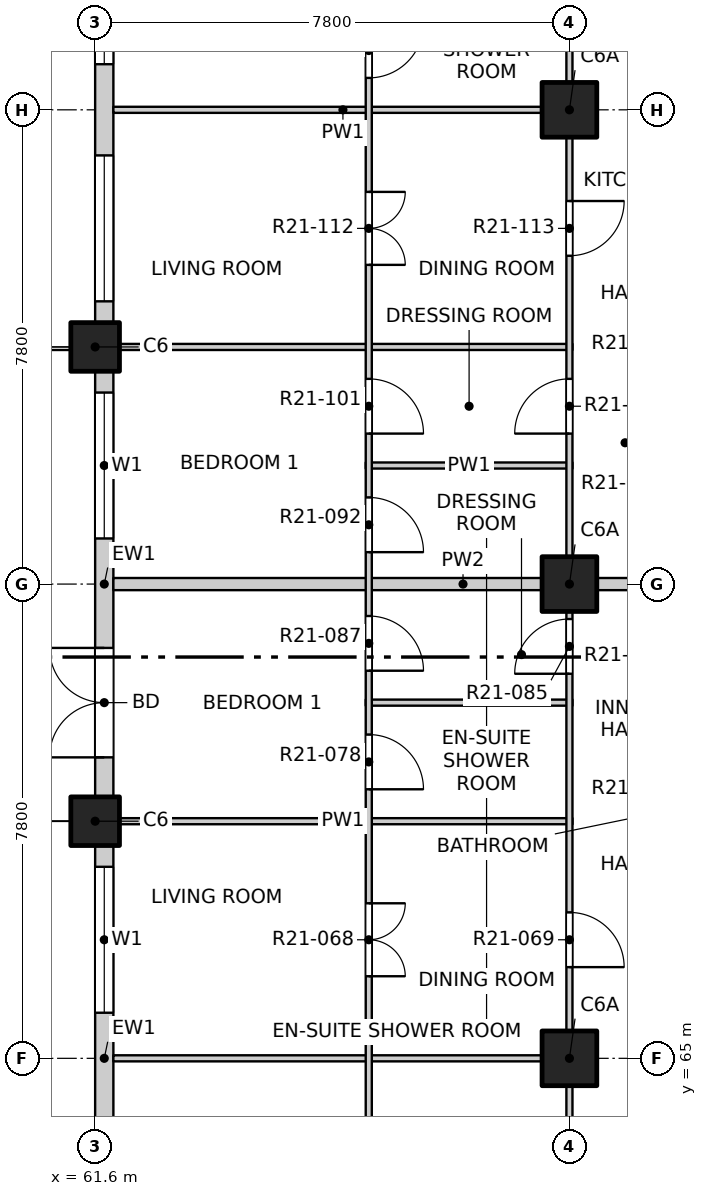
"""IFC4 building model, lengths in metres.
Left out: names, types, materials, properties, quantities, classifications, styles, units other than length and angle.
Written with IfcOpenShell. Run it as: python <this file> out.ifc"""

import sys

from ifc_helpers import new_model, si_unit, direction, frame, frame_2d, origin, origin_2d, place, context, subcontext, project, spatial, rectangle, extrude, element, fill, save


model = new_model("IFC4")
c1 = context("Model", 3, precision=1e-05, world=origin(), true_north=direction((0.0, 1.0)))
c2 = subcontext(c1, "Body", "Model", "MODEL_VIEW")
j1 = project(units=[si_unit("LENGTHUNIT", "METRE"), si_unit("PLANEANGLEUNIT", "RADIAN")], contexts=[c1])
p1 = place(None, origin())
s1 = spatial("IfcSite", under=j1, at=p1, CompositionType="ELEMENT")
p2 = place(p1, origin())
s2 = spatial("IfcBuilding", under=s1, at=p2, CompositionType="ELEMENT")
p3 = place(p2, frame((0.0, 0.0, 221.1)))
s3 = spatial("IfcBuildingStorey", under=s2, at=p3, CompositionType="ELEMENT", Elevation=221.1)
for number, where, z_axis, x_axis in (
    (1, (61.6, 68.9, -0.25), (0.0, 0.0, 1.0), (1.0, 0.0, 0.0)),
    (2, (61.6, 76.7, -0.25), (0.0, 0.0, 1.0), (1.0, 0.0, 0.0)),
):
    element("IfcColumn", number, at=place(p3, frame(where, z_axis=z_axis, x_axis=x_axis)), inside=s3, PredefinedType="COLUMN", context=c2, shape_type="SweptSolid", body=[
        extrude(rectangle(XDim=0.8, YDim=0.8, at=origin_2d()), origin(), (0.0, 0.0, 1.0), 3.4),
    ])
for number, where, z_axis, x_axis in (
    (3, (69.4, 65.0, -0.25), (0.0, 0.0, 1.0), (1.0, 0.0, 0.0)),
    (4, (69.4, 72.8, -0.25), (0.0, 0.0, 1.0), (1.0, 0.0, 0.0)),
    (5, (69.4, 80.6, -0.25), (0.0, 0.0, 1.0), (1.0, 0.0, 0.0)),
):
    element("IfcColumn", number, at=place(p3, frame(where, z_axis=z_axis, x_axis=x_axis)), inside=s3, PredefinedType="COLUMN", context=c2, shape_type="SweptSolid", body=[
        extrude(rectangle(XDim=0.9, YDim=0.9, at=origin_2d()), origin(), (0.0, 0.0, 1.0), 3.4),
    ])
p4 = place(p3, frame((61.75, 61.5, 0.0), z_axis=(0.0, 0.0, 1.0), x_axis=(0.0, 1.0, 0.0)))
e6 = element("IfcWall", 6, at=p4, inside=s3, PredefinedType="SOLIDWALL", context=c2, shape_type="SweptSolid", body=[
    extrude(rectangle(XDim=7.0, YDim=0.3, at=frame_2d((3.5, 0.0))), origin(), (0.0, 0.0, 1.0), 2.7),
])
p5 = place(p4, frame((0.65, 0.0, 0.0)))
e7 = element("IfcOpeningElement", 7, at=p5, cuts=e6, PredefinedType="OPENING", context=c2, shape_type="SweptSolid", body=[
    extrude(rectangle(XDim=1.8, YDim=2.4, at=frame_2d((0.9, 1.2))), frame((0.0, 0.16, 0.0), z_axis=(0.0, -1.0, 0.0), x_axis=(1.0, 0.0, 0.0)), (0.0, 0.0, 1.0), 0.32),
])
p6 = place(p4, frame((4.25, 0.0, 0.9)))
e8 = element("IfcOpeningElement", 8, at=p6, cuts=e6, PredefinedType="OPENING", context=c2, shape_type="SweptSolid", body=[
    extrude(rectangle(XDim=2.4, YDim=1.8, at=frame_2d((1.2, 0.9))), frame((0.0, 0.16, 0.0), z_axis=(0.0, -1.0, 0.0), x_axis=(1.0, 0.0, 0.0)), (0.0, 0.0, 1.0), 0.32),
])
p7 = place(p3, frame((61.75, 69.3, 0.0), z_axis=(0.0, 0.0, 1.0), x_axis=(0.0, 1.0, 0.0)))
e9 = element("IfcWall", 9, at=p7, inside=s3, PredefinedType="SOLIDWALL", context=c2, shape_type="SweptSolid", body=[
    extrude(rectangle(XDim=7.0, YDim=0.3, at=frame_2d((3.5, 0.0))), origin(), (0.0, 0.0, 1.0), 2.7),
])
p8 = place(p7, frame((0.65, 0.0, 0.0)))
e10 = element("IfcOpeningElement", 10, at=p8, cuts=e9, PredefinedType="OPENING", context=c2, shape_type="SweptSolid", body=[
    extrude(rectangle(XDim=1.8, YDim=2.4, at=frame_2d((0.9, 1.2))), frame((0.0, 0.16, 0.0), z_axis=(0.0, -1.0, 0.0), x_axis=(1.0, 0.0, 0.0)), (0.0, 0.0, 1.0), 0.32),
])
p9 = place(p7, frame((4.25, 0.0, 0.9)))
e11 = element("IfcOpeningElement", 11, at=p9, cuts=e9, PredefinedType="OPENING", context=c2, shape_type="SweptSolid", body=[
    extrude(rectangle(XDim=2.4, YDim=1.8, at=frame_2d((1.2, 0.9))), frame((0.0, 0.16, 0.0), z_axis=(0.0, -1.0, 0.0), x_axis=(1.0, 0.0, 0.0)), (0.0, 0.0, 1.0), 0.32),
])
p10 = place(p3, frame((61.75, 77.1, 0.0), z_axis=(0.0, 0.0, 1.0), x_axis=(0.0, 1.0, 0.0)))
e12 = element("IfcWall", 12, at=p10, inside=s3, PredefinedType="SOLIDWALL", context=c2, shape_type="SweptSolid", body=[
    extrude(rectangle(XDim=7.4, YDim=0.3, at=frame_2d((3.7, 0.0))), origin(), (0.0, 0.0, 1.0), 2.7),
])
p11 = place(p10, frame((0.35, 0.0, 0.9)))
e13 = element("IfcOpeningElement", 13, at=p11, cuts=e12, PredefinedType="OPENING", context=c2, shape_type="SweptSolid", body=[
    extrude(rectangle(XDim=2.4, YDim=1.8, at=frame_2d((1.2, 0.9))), frame((0.0, 0.16, 0.0), z_axis=(0.0, -1.0, 0.0), x_axis=(1.0, 0.0, 0.0)), (0.0, 0.0, 1.0), 0.32),
])
p12 = place(p10, frame((4.25, 0.0, 0.9)))
e14 = element("IfcOpeningElement", 14, at=p12, cuts=e12, PredefinedType="OPENING", context=c2, shape_type="SweptSolid", body=[
    extrude(rectangle(XDim=2.4, YDim=1.8, at=frame_2d((1.2, 0.9))), frame((0.0, 0.16, 0.0), z_axis=(0.0, -1.0, 0.0), x_axis=(1.0, 0.0, 0.0)), (0.0, 0.0, 1.0), 0.32),
])
p13 = place(p3, frame((61.9, 65.0, 0.0), z_axis=(0.0, 0.0, 1.0), x_axis=(1.0, 0.0, 0.0)))
e15 = element("IfcWall", 15, at=p13, inside=s3, PredefinedType="PARTITIONING", context=c2, shape_type="SweptSolid", body=[
    extrude(rectangle(XDim=7.55, YDim=0.1, at=frame_2d((3.775, 0.0))), origin(), (0.0, 0.0, 1.0), 3.15),
])
p14 = place(p3, frame((61.9, 68.9, 0.0), z_axis=(0.0, 0.0, 1.0), x_axis=(1.0, 0.0, 0.0)))
e16 = element("IfcWall", 16, at=p14, inside=s3, PredefinedType="PARTITIONING", context=c2, shape_type="SweptSolid", body=[
    extrude(rectangle(XDim=7.55, YDim=0.1, at=frame_2d((3.775, 0.0))), origin(), (0.0, 0.0, 1.0), 2.55),
])
p15 = place(p3, frame((66.05, 70.85, 0.0), z_axis=(0.0, 0.0, 1.0), x_axis=(1.0, 0.0, 0.0)))
e17 = element("IfcWall", 17, at=p15, inside=s3, PredefinedType="PARTITIONING", context=c2, shape_type="SweptSolid", body=[
    extrude(rectangle(XDim=3.4, YDim=0.1, at=frame_2d((1.7, 0.0))), origin(), (0.0, 0.0, 1.0), 3.15),
])
p16 = place(p3, frame((61.9, 72.8, 0.0), z_axis=(0.0, 0.0, 1.0), x_axis=(1.0, 0.0, 0.0)))
e18 = element("IfcWall", 18, at=p16, inside=s3, PredefinedType="PARTITIONING", context=c2, shape_type="SweptSolid", body=[
    extrude(rectangle(XDim=11.5, YDim=0.2, at=frame_2d((5.75, 0.0))), origin(), (0.0, 0.0, 1.0), 3.15),
])
p17 = place(p3, frame((66.05, 74.75, 0.0), z_axis=(0.0, 0.0, 1.0), x_axis=(1.0, 0.0, 0.0)))
e19 = element("IfcWall", 19, at=p17, inside=s3, PredefinedType="PARTITIONING", context=c2, shape_type="SweptSolid", body=[
    extrude(rectangle(XDim=3.4, YDim=0.1, at=frame_2d((1.7, 0.0))), origin(), (0.0, 0.0, 1.0), 3.15),
])
p18 = place(p3, frame((61.9, 76.7, 0.0), z_axis=(0.0, 0.0, 1.0), x_axis=(1.0, 0.0, 0.0)))
e20 = element("IfcWall", 20, at=p18, inside=s3, PredefinedType="PARTITIONING", context=c2, shape_type="SweptSolid", body=[
    extrude(rectangle(XDim=7.55, YDim=0.1, at=frame_2d((3.775, 0.0))), origin(), (0.0, 0.0, 1.0), 2.55),
])
p19 = place(p3, frame((61.9, 80.6, 0.0), z_axis=(0.0, 0.0, 1.0), x_axis=(1.0, 0.0, 0.0)))
e21 = element("IfcWall", 21, at=p19, inside=s3, PredefinedType="PARTITIONING", context=c2, shape_type="SweptSolid", body=[
    extrude(rectangle(XDim=7.55, YDim=0.1, at=frame_2d((3.775, 0.0))), origin(), (0.0, 0.0, 1.0), 3.15),
])
p20 = place(p3, frame((66.1, 61.2, 0.0), z_axis=(0.0, 0.0, 1.0), x_axis=(0.0, 1.0, 0.0)))
e22 = element("IfcWall", 22, at=p20, inside=s3, PredefinedType="PARTITIONING", context=c2, shape_type="SweptSolid", body=[
    extrude(rectangle(XDim=26.9, YDim=0.1, at=frame_2d((13.45, 0.0))), origin(), (0.0, 0.0, 1.0), 3.15),
])
p21 = place(p20, frame((1.25, 0.0, 0.0)))
e23 = element("IfcOpeningElement", 23, at=p21, cuts=e22, PredefinedType="OPENING", context=c2, shape_type="SweptSolid", body=[
    extrude(rectangle(XDim=1.2, YDim=2.1, at=frame_2d((0.6, 1.05))), frame((0.0, 0.06, 0.0), z_axis=(0.0, -1.0, 0.0), x_axis=(1.0, 0.0, 0.0)), (0.0, 0.0, 1.0), 0.12),
])
p22 = place(p20, frame((5.15, 0.0, 0.0)))
e24 = element("IfcOpeningElement", 24, at=p22, cuts=e22, PredefinedType="OPENING", context=c2, shape_type="SweptSolid", body=[
    extrude(rectangle(XDim=1.2, YDim=2.1, at=frame_2d((0.6, 1.05))), frame((0.0, 0.06, 0.0), z_axis=(0.0, -1.0, 0.0), x_axis=(1.0, 0.0, 0.0)), (0.0, 0.0, 1.0), 0.12),
])
p23 = place(p20, frame((8.225, 0.0, 0.0)))
e25 = element("IfcOpeningElement", 25, at=p23, cuts=e22, PredefinedType="OPENING", context=c2, shape_type="SweptSolid", body=[
    extrude(rectangle(XDim=0.9, YDim=2.1, at=frame_2d((0.45, 1.05))), frame((0.0, 0.06, 0.0), z_axis=(0.0, -1.0, 0.0), x_axis=(1.0, 0.0, 0.0)), (0.0, 0.0, 1.0), 0.12),
])
p24 = place(p20, frame((10.175, 0.0, 0.0)))
e26 = element("IfcOpeningElement", 26, at=p24, cuts=e22, PredefinedType="OPENING", context=c2, shape_type="SweptSolid", body=[
    extrude(rectangle(XDim=0.9, YDim=2.1, at=frame_2d((0.45, 1.05))), frame((0.0, 0.06, 0.0), z_axis=(0.0, -1.0, 0.0), x_axis=(1.0, 0.0, 0.0)), (0.0, 0.0, 1.0), 0.12),
])
p25 = place(p20, frame((12.125, 0.0, 0.0)))
e27 = element("IfcOpeningElement", 27, at=p25, cuts=e22, PredefinedType="OPENING", context=c2, shape_type="SweptSolid", body=[
    extrude(rectangle(XDim=0.9, YDim=2.1, at=frame_2d((0.45, 1.05))), frame((0.0, 0.06, 0.0), z_axis=(0.0, -1.0, 0.0), x_axis=(1.0, 0.0, 0.0)), (0.0, 0.0, 1.0), 0.12),
])
p26 = place(p20, frame((14.075, 0.0, 0.0)))
e28 = element("IfcOpeningElement", 28, at=p26, cuts=e22, PredefinedType="OPENING", context=c2, shape_type="SweptSolid", body=[
    extrude(rectangle(XDim=0.9, YDim=2.1, at=frame_2d((0.45, 1.05))), frame((0.0, 0.06, 0.0), z_axis=(0.0, -1.0, 0.0), x_axis=(1.0, 0.0, 0.0)), (0.0, 0.0, 1.0), 0.12),
])
p27 = place(p20, frame((16.85, 0.0, 0.0)))
e29 = element("IfcOpeningElement", 29, at=p27, cuts=e22, PredefinedType="OPENING", context=c2, shape_type="SweptSolid", body=[
    extrude(rectangle(XDim=1.2, YDim=2.1, at=frame_2d((0.6, 1.05))), frame((0.0, 0.06, 0.0), z_axis=(0.0, -1.0, 0.0), x_axis=(1.0, 0.0, 0.0)), (0.0, 0.0, 1.0), 0.12),
])
p28 = place(p20, frame((19.925, 0.0, 0.0)))
e30 = element("IfcOpeningElement", 30, at=p28, cuts=e22, PredefinedType="OPENING", context=c2, shape_type="SweptSolid", body=[
    extrude(rectangle(XDim=0.9, YDim=2.1, at=frame_2d((0.45, 1.05))), frame((0.0, 0.06, 0.0), z_axis=(0.0, -1.0, 0.0), x_axis=(1.0, 0.0, 0.0)), (0.0, 0.0, 1.0), 0.12),
])
p29 = place(p20, frame((21.875, 0.0, 0.0)))
e31 = element("IfcOpeningElement", 31, at=p29, cuts=e22, PredefinedType="OPENING", context=c2, shape_type="SweptSolid", body=[
    extrude(rectangle(XDim=0.9, YDim=2.1, at=frame_2d((0.45, 1.05))), frame((0.0, 0.06, 0.0), z_axis=(0.0, -1.0, 0.0), x_axis=(1.0, 0.0, 0.0)), (0.0, 0.0, 1.0), 0.12),
])
p30 = place(p20, frame((24.65, 0.0, 0.0)))
e32 = element("IfcOpeningElement", 32, at=p30, cuts=e22, PredefinedType="OPENING", context=c2, shape_type="SweptSolid", body=[
    extrude(rectangle(XDim=1.2, YDim=2.1, at=frame_2d((0.6, 1.05))), frame((0.0, 0.06, 0.0), z_axis=(0.0, -1.0, 0.0), x_axis=(1.0, 0.0, 0.0)), (0.0, 0.0, 1.0), 0.12),
])
p31 = place(p3, frame((69.4, 41.9, 0.0), z_axis=(0.0, 0.0, 1.0), x_axis=(0.0, 1.0, 0.0)))
e33 = element("IfcWall", 33, at=p31, inside=s3, PredefinedType="PARTITIONING", context=c2, shape_type="SweptSolid", body=[
    extrude(rectangle(XDim=46.2, YDim=0.1, at=frame_2d((23.1, 0.0))), origin(), (0.0, 0.0, 1.0), 3.15),
])
p32 = place(p31, frame((1.2, 0.0, 0.0)))
e34 = element("IfcOpeningElement", 34, at=p32, cuts=e33, PredefinedType="OPENING", context=c2, shape_type="SweptSolid", body=[
    extrude(rectangle(XDim=0.9, YDim=2.1, at=frame_2d((0.45, 1.05))), frame((0.0, 0.06, 0.0), z_axis=(0.0, -1.0, 0.0), x_axis=(1.0, 0.0, 0.0)), (0.0, 0.0, 1.0), 0.12),
])
p33 = place(p31, frame((6.025, 0.0, 0.0)))
e35 = element("IfcOpeningElement", 35, at=p33, cuts=e33, PredefinedType="OPENING", context=c2, shape_type="SweptSolid", body=[
    extrude(rectangle(XDim=0.9, YDim=2.1, at=frame_2d((0.45, 1.05))), frame((0.0, 0.06, 0.0), z_axis=(0.0, -1.0, 0.0), x_axis=(1.0, 0.0, 0.0)), (0.0, 0.0, 1.0), 0.12),
])
p34 = place(p31, frame((9.0, 0.0, 0.0)))
e36 = element("IfcOpeningElement", 36, at=p34, cuts=e33, PredefinedType="OPENING", context=c2, shape_type="SweptSolid", body=[
    extrude(rectangle(XDim=0.9, YDim=2.1, at=frame_2d((0.45, 1.05))), frame((0.0, 0.06, 0.0), z_axis=(0.0, -1.0, 0.0), x_axis=(1.0, 0.0, 0.0)), (0.0, 0.0, 1.0), 0.12),
])
p35 = place(p31, frame((12.9, 0.0, 0.0)))
e37 = element("IfcOpeningElement", 37, at=p35, cuts=e33, PredefinedType="OPENING", context=c2, shape_type="SweptSolid", body=[
    extrude(rectangle(XDim=0.9, YDim=2.1, at=frame_2d((0.45, 1.05))), frame((0.0, 0.06, 0.0), z_axis=(0.0, -1.0, 0.0), x_axis=(1.0, 0.0, 0.0)), (0.0, 0.0, 1.0), 0.12),
])
p36 = place(p31, frame((17.775, 0.0, 0.0)))
e38 = element("IfcOpeningElement", 38, at=p36, cuts=e33, PredefinedType="OPENING", context=c2, shape_type="SweptSolid", body=[
    extrude(rectangle(XDim=0.9, YDim=2.1, at=frame_2d((0.45, 1.05))), frame((0.0, 0.06, 0.0), z_axis=(0.0, -1.0, 0.0), x_axis=(1.0, 0.0, 0.0)), (0.0, 0.0, 1.0), 0.12),
])
p37 = place(p31, frame((20.7, 0.0, 0.0)))
e39 = element("IfcOpeningElement", 39, at=p37, cuts=e33, PredefinedType="OPENING", context=c2, shape_type="SweptSolid", body=[
    extrude(rectangle(XDim=0.9, YDim=2.1, at=frame_2d((0.45, 1.05))), frame((0.0, 0.06, 0.0), z_axis=(0.0, -1.0, 0.0), x_axis=(1.0, 0.0, 0.0)), (0.0, 0.0, 1.0), 0.12),
])
p38 = place(p31, frame((24.6, 0.0, 0.0)))
e40 = element("IfcOpeningElement", 40, at=p38, cuts=e33, PredefinedType="OPENING", context=c2, shape_type="SweptSolid", body=[
    extrude(rectangle(XDim=0.9, YDim=2.1, at=frame_2d((0.45, 1.05))), frame((0.0, 0.06, 0.0), z_axis=(0.0, -1.0, 0.0), x_axis=(1.0, 0.0, 0.0)), (0.0, 0.0, 1.0), 0.12),
])
p39 = place(p31, frame((29.425, 0.0, 0.0)))
e41 = element("IfcOpeningElement", 41, at=p39, cuts=e33, PredefinedType="OPENING", context=c2, shape_type="SweptSolid", body=[
    extrude(rectangle(XDim=0.9, YDim=2.1, at=frame_2d((0.45, 1.05))), frame((0.0, 0.06, 0.0), z_axis=(0.0, -1.0, 0.0), x_axis=(1.0, 0.0, 0.0)), (0.0, 0.0, 1.0), 0.12),
])
p40 = place(p31, frame((33.375, 0.0, 0.0)))
e42 = element("IfcOpeningElement", 42, at=p40, cuts=e33, PredefinedType="OPENING", context=c2, shape_type="SweptSolid", body=[
    extrude(rectangle(XDim=0.9, YDim=2.1, at=frame_2d((0.45, 1.05))), frame((0.0, 0.06, 0.0), z_axis=(0.0, -1.0, 0.0), x_axis=(1.0, 0.0, 0.0)), (0.0, 0.0, 1.0), 0.12),
])
p41 = place(p31, frame((36.3, 0.0, 0.0)))
e43 = element("IfcOpeningElement", 43, at=p41, cuts=e33, PredefinedType="OPENING", context=c2, shape_type="SweptSolid", body=[
    extrude(rectangle(XDim=0.9, YDim=2.1, at=frame_2d((0.45, 1.05))), frame((0.0, 0.06, 0.0), z_axis=(0.0, -1.0, 0.0), x_axis=(1.0, 0.0, 0.0)), (0.0, 0.0, 1.0), 0.12),
])
p42 = place(p31, frame((41.175, 0.0, 0.0)))
e44 = element("IfcOpeningElement", 44, at=p42, cuts=e33, PredefinedType="OPENING", context=c2, shape_type="SweptSolid", body=[
    extrude(rectangle(XDim=0.9, YDim=2.1, at=frame_2d((0.45, 1.05))), frame((0.0, 0.06, 0.0), z_axis=(0.0, -1.0, 0.0), x_axis=(1.0, 0.0, 0.0)), (0.0, 0.0, 1.0), 0.12),
])
p43 = place(p31, frame((44.1, 0.0, 0.0)))
e45 = element("IfcOpeningElement", 45, at=p43, cuts=e33, PredefinedType="OPENING", context=c2, shape_type="SweptSolid", body=[
    extrude(rectangle(XDim=0.9, YDim=2.1, at=frame_2d((0.45, 1.05))), frame((0.0, 0.06, 0.0), z_axis=(0.0, -1.0, 0.0), x_axis=(1.0, 0.0, 0.0)), (0.0, 0.0, 1.0), 0.12),
])
p44 = place(p6, origin())
e46 = element("IfcWindow", 46, at=p44, inside=s3, PartitioningType="DOUBLE_PANEL_VERTICAL", PredefinedType="WINDOW", context=c2, shape_type="SweptSolid", body=[
    extrude(rectangle(XDim=2.4, YDim=1.8, at=frame_2d((1.2, 0.9))), frame((0.0, 0.03, 0.0), z_axis=(0.0, -1.0, 0.0), x_axis=(1.0, 0.0, 0.0)), (0.0, 0.0, 1.0), 0.06),
])
fill(e8, e46)
p45 = place(p8, origin())
e47 = element("IfcDoor", 47, at=p45, inside=s3, OperationType="DOUBLE_DOOR_SINGLE_SWING", PredefinedType="DOOR", context=c2, shape_type="SweptSolid", body=[
    extrude(rectangle(XDim=1.8, YDim=2.4, at=frame_2d((0.9, 1.2))), frame((0.0, 0.025, 0.0), z_axis=(0.0, -1.0, 0.0), x_axis=(1.0, 0.0, 0.0)), (0.0, 0.0, 1.0), 0.05),
])
fill(e10, e47)
p46 = place(p9, origin())
e48 = element("IfcWindow", 48, at=p46, inside=s3, PartitioningType="DOUBLE_PANEL_VERTICAL", PredefinedType="WINDOW", context=c2, shape_type="SweptSolid", body=[
    extrude(rectangle(XDim=2.4, YDim=1.8, at=frame_2d((1.2, 0.9))), frame((0.0, 0.03, 0.0), z_axis=(0.0, -1.0, 0.0), x_axis=(1.0, 0.0, 0.0)), (0.0, 0.0, 1.0), 0.06),
])
fill(e11, e48)
p47 = place(p11, origin())
e49 = element("IfcWindow", 49, at=p47, inside=s3, PartitioningType="DOUBLE_PANEL_VERTICAL", PredefinedType="WINDOW", context=c2, shape_type="SweptSolid", body=[
    extrude(rectangle(XDim=2.4, YDim=1.8, at=frame_2d((1.2, 0.9))), frame((0.0, 0.03, 0.0), z_axis=(0.0, -1.0, 0.0), x_axis=(1.0, 0.0, 0.0)), (0.0, 0.0, 1.0), 0.06),
])
fill(e13, e49)
p48 = place(p12, origin())
e50 = element("IfcWindow", 50, at=p48, inside=s3, PartitioningType="DOUBLE_PANEL_VERTICAL", PredefinedType="WINDOW", context=c2, shape_type="SweptSolid", body=[
    extrude(rectangle(XDim=2.4, YDim=1.8, at=frame_2d((1.2, 0.9))), frame((0.0, 0.03, 0.0), z_axis=(0.0, -1.0, 0.0), x_axis=(1.0, 0.0, 0.0)), (0.0, 0.0, 1.0), 0.06),
])
fill(e14, e50)
p49 = place(p22, origin())
e51 = element("IfcDoor", 51, at=p49, inside=s3, OperationType="DOUBLE_DOOR_SINGLE_SWING", PredefinedType="DOOR", context=c2, shape_type="SweptSolid", body=[
    extrude(rectangle(XDim=1.2, YDim=2.1, at=frame_2d((0.6, 1.05))), frame((0.0, 0.025, 0.0), z_axis=(0.0, -1.0, 0.0), x_axis=(1.0, 0.0, 0.0)), (0.0, 0.0, 1.0), 0.05),
])
fill(e24, e51)
p50 = place(p38, origin())
e52 = element("IfcDoor", 52, at=p50, inside=s3, OperationType="SINGLE_SWING_RIGHT", PredefinedType="DOOR", context=c2, shape_type="SweptSolid", body=[
    extrude(rectangle(XDim=0.9, YDim=2.1, at=frame_2d((0.45, 1.05))), frame((0.0, 0.025, 0.0), z_axis=(0.0, -1.0, 0.0), x_axis=(1.0, 0.0, 0.0)), (0.0, 0.0, 1.0), 0.05),
])
fill(e40, e52)
p51 = place(p23, origin())
e53 = element("IfcDoor", 53, at=p51, inside=s3, OperationType="SINGLE_SWING_RIGHT", PredefinedType="DOOR", context=c2, shape_type="SweptSolid", body=[
    extrude(rectangle(XDim=0.9, YDim=2.1, at=frame_2d((0.45, 1.05))), frame((0.0, 0.025, 0.0), z_axis=(0.0, -1.0, 0.0), x_axis=(1.0, 0.0, 0.0)), (0.0, 0.0, 1.0), 0.05),
])
fill(e25, e53)
p52 = place(p39, origin())
e54 = element("IfcDoor", 54, at=p52, inside=s3, OperationType="SINGLE_SWING_LEFT", PredefinedType="DOOR", context=c2, shape_type="SweptSolid", body=[
    extrude(rectangle(XDim=0.9, YDim=2.1, at=frame_2d((0.45, 1.05))), frame((0.0, 0.025, 0.0), z_axis=(0.0, -1.0, 0.0), x_axis=(1.0, 0.0, 0.0)), (0.0, 0.0, 1.0), 0.05),
])
fill(e41, e54)
p53 = place(p24, origin())
e55 = element("IfcDoor", 55, at=p53, inside=s3, OperationType="SINGLE_SWING_RIGHT", PredefinedType="DOOR", context=c2, shape_type="SweptSolid", body=[
    extrude(rectangle(XDim=0.9, YDim=2.1, at=frame_2d((0.45, 1.05))), frame((0.0, 0.025, 0.0), z_axis=(0.0, -1.0, 0.0), x_axis=(1.0, 0.0, 0.0)), (0.0, 0.0, 1.0), 0.05),
])
fill(e26, e55)
p54 = place(p25, origin())
e56 = element("IfcDoor", 56, at=p54, inside=s3, OperationType="SINGLE_SWING_RIGHT", PredefinedType="DOOR", context=c2, shape_type="SweptSolid", body=[
    extrude(rectangle(XDim=0.9, YDim=2.1, at=frame_2d((0.45, 1.05))), frame((0.0, 0.025, 0.0), z_axis=(0.0, -1.0, 0.0), x_axis=(1.0, 0.0, 0.0)), (0.0, 0.0, 1.0), 0.05),
])
fill(e27, e56)
p55 = place(p26, origin())
e57 = element("IfcDoor", 57, at=p55, inside=s3, OperationType="SINGLE_SWING_RIGHT", PredefinedType="DOOR", context=c2, shape_type="SweptSolid", body=[
    extrude(rectangle(XDim=0.9, YDim=2.1, at=frame_2d((0.45, 1.05))), frame((0.0, 0.025, 0.0), z_axis=(0.0, -1.0, 0.0), x_axis=(1.0, 0.0, 0.0)), (0.0, 0.0, 1.0), 0.05),
])
fill(e28, e57)
p56 = place(p40, origin())
e58 = element("IfcDoor", 58, at=p56, inside=s3, OperationType="SINGLE_SWING_LEFT", PredefinedType="DOOR", context=c2, shape_type="SweptSolid", body=[
    extrude(rectangle(XDim=0.9, YDim=2.1, at=frame_2d((0.45, 1.05))), frame((0.0, 0.025, 0.0), z_axis=(0.0, -1.0, 0.0), x_axis=(1.0, 0.0, 0.0)), (0.0, 0.0, 1.0), 0.05),
])
fill(e42, e58)
p57 = place(p27, origin())
e59 = element("IfcDoor", 59, at=p57, inside=s3, OperationType="DOUBLE_DOOR_SINGLE_SWING", PredefinedType="DOOR", context=c2, shape_type="SweptSolid", body=[
    extrude(rectangle(XDim=1.2, YDim=2.1, at=frame_2d((0.6, 1.05))), frame((0.0, 0.025, 0.0), z_axis=(0.0, -1.0, 0.0), x_axis=(1.0, 0.0, 0.0)), (0.0, 0.0, 1.0), 0.05),
])
fill(e29, e59)
p58 = place(p41, origin())
e60 = element("IfcDoor", 60, at=p58, inside=s3, OperationType="SINGLE_SWING_LEFT", PredefinedType="DOOR", context=c2, shape_type="SweptSolid", body=[
    extrude(rectangle(XDim=0.9, YDim=2.1, at=frame_2d((0.45, 1.05))), frame((0.0, 0.025, 0.0), z_axis=(0.0, -1.0, 0.0), x_axis=(1.0, 0.0, 0.0)), (0.0, 0.0, 1.0), 0.05),
])
fill(e43, e60)
p59 = place(p28, origin())
e61 = element("IfcDoor", 61, at=p59, inside=s3, OperationType="SINGLE_SWING_LEFT", PredefinedType="DOOR", context=c2, shape_type="SweptSolid", body=[
    extrude(rectangle(XDim=0.9, YDim=2.1, at=frame_2d((0.45, 1.05))), frame((0.0, 0.025, 0.0), z_axis=(0.0, -1.0, 0.0), x_axis=(1.0, 0.0, 0.0)), (0.0, 0.0, 1.0), 0.05),
])
fill(e30, e61)
save(model, sys.argv[1])
